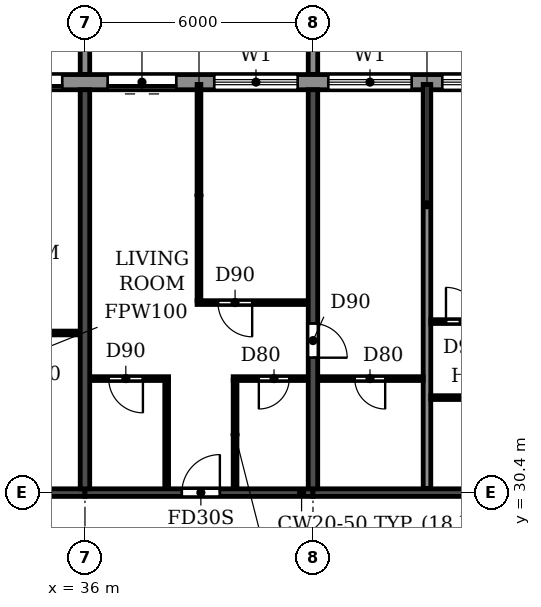
"""IFC4 building model, lengths in metres.
Left out: names, types, materials, properties, quantities, classifications, styles, units other than length and angle.
Written with IfcOpenShell. Run it as: python <this file> out.ifc"""

import sys

from ifc_helpers import new_model, si_unit, direction, frame, frame_2d, origin, place, context, subcontext, project, spatial, polyline, rectangle, outline, extrude, source, transform, mapped, element, fill, save


model = new_model("IFC4")
c1 = context("Model", 3, precision=1e-05, world=origin(), true_north=direction((0.0, 1.0)))
c2 = subcontext(c1, "Body", "Model", "MODEL_VIEW")
j1 = project(units=[si_unit("LENGTHUNIT", "METRE"), si_unit("PLANEANGLEUNIT", "RADIAN")], contexts=[c1])
p1 = place(None, origin())
s1 = spatial("IfcSite", under=j1, at=p1, CompositionType="ELEMENT")
p2 = place(p1, origin())
s2 = spatial("IfcBuilding", under=s1, at=p2, CompositionType="ELEMENT")
p3 = place(p2, frame((0.0, 0.0, 208.2)))
s3 = spatial("IfcBuildingStorey", under=s2, at=p3, CompositionType="ELEMENT", Elevation=208.2)
p4 = place(p3, frame((36.0, 30.5, 0.0), z_axis=(0.0, 0.0, 1.0), x_axis=(0.0, 1.0, 0.0)))
e1 = element("IfcWall", 1, at=p4, inside=s3, PredefinedType="SHEAR", context=c2, shape_type="SweptSolid", body=[
    extrude(rectangle(XDim=10.5, YDim=0.25, at=frame_2d((5.25, 0.0))), origin(), (0.0, 0.0, 1.0), 3.0),
])
p5 = place(p3, frame((42.0, 30.5, 0.0), z_axis=(0.0, 0.0, 1.0), x_axis=(0.0, 1.0, 0.0)))
e2 = element("IfcWall", 2, at=p5, inside=s3, PredefinedType="SHEAR", context=c2, shape_type="SweptSolid", body=[
    extrude(rectangle(XDim=10.5, YDim=0.25, at=frame_2d((5.25, 0.0))), origin(), (0.0, 0.0, 1.0), 3.0),
])
p6 = place(p5, frame((3.45, 0.0, 0.0)))
e3 = element("IfcOpeningElement", 3, at=p6, cuts=e2, PredefinedType="OPENING", context=c2, shape_type="SweptSolid", body=[
    extrude(rectangle(XDim=0.9, YDim=2.1, at=frame_2d((0.45, 1.05))), frame((0.0, 0.135, 0.0), z_axis=(0.0, -1.0, 0.0), x_axis=(1.0, 0.0, 0.0)), (0.0, 0.0, 1.0), 0.27),
])
p7 = place(p3, frame((30.0, 30.4, 0.0), z_axis=(0.0, 0.0, 1.0), x_axis=(1.0, 0.0, 0.0)))
e4 = element("IfcWall", 4, at=p7, inside=s3, PredefinedType="SHEAR", context=c2, shape_type="SweptSolid", body=[
    extrude(rectangle(XDim=6.0, YDim=0.2, at=frame_2d((3.0, 0.0))), origin(), (0.0, 0.0, 1.0), 2.4),
])
p8 = place(p7, frame((2.45, 0.0, 0.0)))
e5 = element("IfcOpeningElement", 5, at=p8, cuts=e4, PredefinedType="OPENING", context=c2, shape_type="SweptSolid", body=[
    extrude(rectangle(XDim=1.0, YDim=2.1, at=frame_2d((0.5, 1.05))), frame((0.0, 0.11, 0.0), z_axis=(0.0, -1.0, 0.0), x_axis=(1.0, 0.0, 0.0)), (0.0, 0.0, 1.0), 0.22),
])
p9 = place(p3, frame((36.0, 30.4, 0.0), z_axis=(0.0, 0.0, 1.0), x_axis=(1.0, 0.0, 0.0)))
e6 = element("IfcWall", 6, at=p9, inside=s3, PredefinedType="SHEAR", context=c2, shape_type="SweptSolid", body=[
    extrude(rectangle(XDim=6.0, YDim=0.2, at=frame_2d((3.0, 0.0))), origin(), (0.0, 0.0, 1.0), 2.4),
])
p10 = place(p9, frame((2.55, 0.0, 0.0)))
e7 = element("IfcOpeningElement", 7, at=p10, cuts=e6, PredefinedType="OPENING", context=c2, shape_type="SweptSolid", body=[
    extrude(rectangle(XDim=1.0, YDim=2.1, at=frame_2d((0.5, 1.05))), frame((0.0, 0.11, 0.0), z_axis=(0.0, -1.0, 0.0), x_axis=(1.0, 0.0, 0.0)), (0.0, 0.0, 1.0), 0.22),
])
p11 = place(p3, frame((42.0, 30.4, 0.0), z_axis=(0.0, 0.0, 1.0), x_axis=(1.0, 0.0, 0.0)))
e8 = element("IfcWall", 8, at=p11, inside=s3, PredefinedType="SHEAR", context=c2, shape_type="SweptSolid", body=[
    extrude(rectangle(XDim=6.0, YDim=0.2, at=frame_2d((3.0, 0.0))), origin(), (0.0, 0.0, 1.0), 2.4),
])
p12 = place(p3, frame((79.317, 41.2, 0.0), z_axis=(0.0, 0.0, 1.0), x_axis=(-1.0, 0.0, 0.0)))
e9 = element("IfcWall", 9, at=p12, inside=s3, PredefinedType="STANDARD", context=c2, shape_type="SweptSolid", body=[
    extrude(rectangle(XDim=56.634, YDim=0.4, at=frame_2d((28.317, 0.0))), origin(), (0.0, 0.0, 1.0), 3.0),
])
p13 = place(p12, frame((52.717, 0.0, 0.9)))
e10 = element("IfcOpeningElement", 10, at=p13, cuts=e9, PredefinedType="OPENING", context=c2, shape_type="SweptSolid", body=[
    extrude(rectangle(XDim=2.2, YDim=1.5, at=frame_2d((1.1, 0.75))), frame((0.0, 0.21, 0.0), z_axis=(0.0, -1.0, 0.0), x_axis=(1.0, 0.0, 0.0)), (0.0, 0.0, 1.0), 0.42),
])
p14 = place(p12, frame((49.917, 0.0, 0.0)))
e11 = element("IfcOpeningElement", 11, at=p14, cuts=e9, PredefinedType="OPENING", context=c2, shape_type="SweptSolid", body=[
    extrude(rectangle(XDim=1.8, YDim=2.4, at=frame_2d((0.9, 1.2))), frame((0.0, 0.21, 0.0), z_axis=(0.0, -1.0, 0.0), x_axis=(1.0, 0.0, 0.0)), (0.0, 0.0, 1.0), 0.42),
])
p15 = place(p12, frame((46.717, 0.0, 0.9)))
e12 = element("IfcOpeningElement", 12, at=p15, cuts=e9, PredefinedType="OPENING", context=c2, shape_type="SweptSolid", body=[
    extrude(rectangle(XDim=2.2, YDim=1.5, at=frame_2d((1.1, 0.75))), frame((0.0, 0.21, 0.0), z_axis=(0.0, -1.0, 0.0), x_axis=(1.0, 0.0, 0.0)), (0.0, 0.0, 1.0), 0.42),
])
p16 = place(p12, frame((43.917, 0.0, 0.0)))
e13 = element("IfcOpeningElement", 13, at=p16, cuts=e9, PredefinedType="OPENING", context=c2, shape_type="SweptSolid", body=[
    extrude(rectangle(XDim=1.8, YDim=2.4, at=frame_2d((0.9, 1.2))), frame((0.0, 0.21, 0.0), z_axis=(0.0, -1.0, 0.0), x_axis=(1.0, 0.0, 0.0)), (0.0, 0.0, 1.0), 0.42),
])
p17 = place(p12, frame((40.917, 0.0, 0.0)))
e14 = element("IfcOpeningElement", 14, at=p17, cuts=e9, PredefinedType="OPENING", context=c2, shape_type="SweptSolid", body=[
    extrude(rectangle(XDim=1.8, YDim=2.4, at=frame_2d((0.9, 1.2))), frame((0.0, 0.21, 0.0), z_axis=(0.0, -1.0, 0.0), x_axis=(1.0, 0.0, 0.0)), (0.0, 0.0, 1.0), 0.42),
])
p18 = place(p12, frame((37.717, 0.0, 0.9)))
e15 = element("IfcOpeningElement", 15, at=p18, cuts=e9, PredefinedType="OPENING", context=c2, shape_type="SweptSolid", body=[
    extrude(rectangle(XDim=2.2, YDim=1.5, at=frame_2d((1.1, 0.75))), frame((0.0, 0.21, 0.0), z_axis=(0.0, -1.0, 0.0), x_axis=(1.0, 0.0, 0.0)), (0.0, 0.0, 1.0), 0.42),
])
p19 = place(p12, frame((34.717, 0.0, 0.9)))
e16 = element("IfcOpeningElement", 16, at=p19, cuts=e9, PredefinedType="OPENING", context=c2, shape_type="SweptSolid", body=[
    extrude(rectangle(XDim=2.2, YDim=1.5, at=frame_2d((1.1, 0.75))), frame((0.0, 0.21, 0.0), z_axis=(0.0, -1.0, 0.0), x_axis=(1.0, 0.0, 0.0)), (0.0, 0.0, 1.0), 0.42),
])
p20 = place(p12, frame((31.717, 0.0, 0.9)))
e17 = element("IfcOpeningElement", 17, at=p20, cuts=e9, PredefinedType="OPENING", context=c2, shape_type="SweptSolid", body=[
    extrude(rectangle(XDim=2.2, YDim=1.5, at=frame_2d((1.1, 0.75))), frame((0.0, 0.21, 0.0), z_axis=(0.0, -1.0, 0.0), x_axis=(1.0, 0.0, 0.0)), (0.0, 0.0, 1.0), 0.42),
])
p21 = place(p12, frame((28.717, 0.0, 0.9)))
e18 = element("IfcOpeningElement", 18, at=p21, cuts=e9, PredefinedType="OPENING", context=c2, shape_type="SweptSolid", body=[
    extrude(rectangle(XDim=2.2, YDim=1.5, at=frame_2d((1.1, 0.75))), frame((0.0, 0.21, 0.0), z_axis=(0.0, -1.0, 0.0), x_axis=(1.0, 0.0, 0.0)), (0.0, 0.0, 1.0), 0.42),
])
p22 = place(p12, frame((25.917, 0.0, 0.0)))
e19 = element("IfcOpeningElement", 19, at=p22, cuts=e9, PredefinedType="OPENING", context=c2, shape_type="SweptSolid", body=[
    extrude(rectangle(XDim=1.8, YDim=2.4, at=frame_2d((0.9, 1.2))), frame((0.0, 0.21, 0.0), z_axis=(0.0, -1.0, 0.0), x_axis=(1.0, 0.0, 0.0)), (0.0, 0.0, 1.0), 0.42),
])
p23 = place(p12, frame((22.717, 0.0, 0.9)))
e20 = element("IfcOpeningElement", 20, at=p23, cuts=e9, PredefinedType="OPENING", context=c2, shape_type="SweptSolid", body=[
    extrude(rectangle(XDim=2.2, YDim=1.5, at=frame_2d((1.1, 0.75))), frame((0.0, 0.21, 0.0), z_axis=(0.0, -1.0, 0.0), x_axis=(1.0, 0.0, 0.0)), (0.0, 0.0, 1.0), 0.42),
])
p24 = place(p12, frame((19.717, 0.0, 0.9)))
e21 = element("IfcOpeningElement", 21, at=p24, cuts=e9, PredefinedType="OPENING", context=c2, shape_type="SweptSolid", body=[
    extrude(rectangle(XDim=2.2, YDim=1.5, at=frame_2d((1.1, 0.75))), frame((0.0, 0.21, 0.0), z_axis=(0.0, -1.0, 0.0), x_axis=(1.0, 0.0, 0.0)), (0.0, 0.0, 1.0), 0.42),
])
p25 = place(p12, frame((16.917, 0.0, 0.0)))
e22 = element("IfcOpeningElement", 22, at=p25, cuts=e9, PredefinedType="OPENING", context=c2, shape_type="SweptSolid", body=[
    extrude(rectangle(XDim=1.8, YDim=2.4, at=frame_2d((0.9, 1.2))), frame((0.0, 0.21, 0.0), z_axis=(0.0, -1.0, 0.0), x_axis=(1.0, 0.0, 0.0)), (0.0, 0.0, 1.0), 0.42),
])
p26 = place(p12, frame((13.717, 0.0, 0.9)))
e23 = element("IfcOpeningElement", 23, at=p26, cuts=e9, PredefinedType="OPENING", context=c2, shape_type="SweptSolid", body=[
    extrude(rectangle(XDim=2.2, YDim=1.5, at=frame_2d((1.1, 0.75))), frame((0.0, 0.21, 0.0), z_axis=(0.0, -1.0, 0.0), x_axis=(1.0, 0.0, 0.0)), (0.0, 0.0, 1.0), 0.42),
])
p27 = place(p12, frame((10.717, 0.0, 0.9)))
e24 = element("IfcOpeningElement", 24, at=p27, cuts=e9, PredefinedType="OPENING", context=c2, shape_type="SweptSolid", body=[
    extrude(rectangle(XDim=2.2, YDim=1.5, at=frame_2d((1.1, 0.75))), frame((0.0, 0.21, 0.0), z_axis=(0.0, -1.0, 0.0), x_axis=(1.0, 0.0, 0.0)), (0.0, 0.0, 1.0), 0.42),
])
p28 = place(p12, frame((7.717, 0.0, 0.9)))
e25 = element("IfcOpeningElement", 25, at=p28, cuts=e9, PredefinedType="OPENING", context=c2, shape_type="SweptSolid", body=[
    extrude(rectangle(XDim=2.2, YDim=1.5, at=frame_2d((1.1, 0.75))), frame((0.0, 0.21, 0.0), z_axis=(0.0, -1.0, 0.0), x_axis=(1.0, 0.0, 0.0)), (0.0, 0.0, 1.0), 0.42),
])
p29 = place(p12, frame((4.917, 0.0, 0.0)))
e26 = element("IfcOpeningElement", 26, at=p29, cuts=e9, PredefinedType="OPENING", context=c2, shape_type="SweptSolid", body=[
    extrude(rectangle(XDim=1.8, YDim=2.4, at=frame_2d((0.9, 1.2))), frame((0.0, 0.21, 0.0), z_axis=(0.0, -1.0, 0.0), x_axis=(1.0, 0.0, 0.0)), (0.0, 0.0, 1.0), 0.42),
])
p30 = place(p12, frame((1.717, 0.0, 0.9)))
e27 = element("IfcOpeningElement", 27, at=p30, cuts=e9, PredefinedType="OPENING", context=c2, shape_type="SweptSolid", body=[
    extrude(rectangle(XDim=2.2, YDim=1.5, at=frame_2d((1.1, 0.75))), frame((0.0, 0.21, 0.0), z_axis=(0.0, -1.0, 0.0), x_axis=(1.0, 0.0, 0.0)), (0.0, 0.0, 1.0), 0.42),
])
m1 = source(origin(), c2, "Body", "SweptSolid", [
    extrude(outline(polyline([(0.0, 0.0), (0.25, 0.0), (0.25, 3.1), (0.0, 3.1), (0.0, 0.0)])), origin(), (0.0, 0.0, 1.0), 3.1),
])
for number, where in (
    (28, (35.875, 41.4, 0.0)),
    (29, (41.875, 41.4, 0.0)),
):
    element("IfcWall", number, at=place(p3, frame(where)), inside=s3, PredefinedType="STANDARD", context=c2, shape_type="MappedRepresentation", body=[
        mapped(m1, transform((0.0, 0.0, 0.0))),
    ])
p31 = place(p3, frame((45.0, 30.51, 0.0), z_axis=(0.0, 0.0, 1.0), x_axis=(0.0, 1.0, 0.0)))
e30 = element("IfcWall", 30, at=p31, inside=s3, PredefinedType="PARTITIONING", context=c2, shape_type="SweptSolid", body=[
    extrude(rectangle(XDim=10.63, YDim=0.2, at=frame_2d((5.315, 0.0))), origin(), (0.0, 0.0, 1.0), 3.0),
])
p32 = place(p3, frame((45.1, 32.9, 0.0), z_axis=(0.0, 0.0, 1.0), x_axis=(1.0, 0.0, 0.0)))
e31 = element("IfcWall", 31, at=p32, inside=s3, PredefinedType="PARTITIONING", context=c2, shape_type="SweptSolid", body=[
    extrude(rectangle(XDim=2.765, YDim=0.1, at=frame_2d((1.382, 0.0))), origin(), (0.0, 0.0, 1.0), 3.0),
])
p33 = place(p32, frame((1.0, 0.0, 0.0)))
e32 = element("IfcOpeningElement", 32, at=p33, cuts=e31, PredefinedType="OPENING", context=c2, shape_type="SweptSolid", body=[
    extrude(rectangle(XDim=0.8, YDim=2.1, at=frame_2d((0.4, 1.05))), frame((0.0, 0.06, 0.0), z_axis=(0.0, -1.0, 0.0), x_axis=(1.0, 0.0, 0.0)), (0.0, 0.0, 1.0), 0.12),
])
p34 = place(p3, frame((36.135, 33.4, 0.0), z_axis=(0.0, 0.0, 1.0), x_axis=(1.0, 0.0, 0.0)))
e33 = element("IfcWall", 33, at=p34, inside=s3, PredefinedType="PARTITIONING", context=c2, shape_type="SweptSolid", body=[
    extrude(rectangle(XDim=2.065, YDim=0.1, at=frame_2d((1.032, 0.0))), origin(), (0.0, 0.0, 1.0), 3.0),
])
p35 = place(p34, frame((0.49, 0.0, 0.0)))
e34 = element("IfcOpeningElement", 34, at=p35, cuts=e33, PredefinedType="OPENING", context=c2, shape_type="SweptSolid", body=[
    extrude(rectangle(XDim=0.9, YDim=2.1, at=frame_2d((0.45, 1.05))), frame((0.0, 0.06, 0.0), z_axis=(0.0, -1.0, 0.0), x_axis=(1.0, 0.0, 0.0)), (0.0, 0.0, 1.0), 0.12),
])
p36 = place(p3, frame((39.9, 33.4, 0.0), z_axis=(0.0, 0.0, 1.0), x_axis=(1.0, 0.0, 0.0)))
e35 = element("IfcWall", 35, at=p36, inside=s3, PredefinedType="PARTITIONING", context=c2, shape_type="SweptSolid", body=[
    extrude(rectangle(XDim=1.965, YDim=0.1, at=frame_2d((0.982, 0.0))), origin(), (0.0, 0.0, 1.0), 3.0),
])
p37 = place(p36, frame((0.675, 0.0, 0.0)))
e36 = element("IfcOpeningElement", 36, at=p37, cuts=e35, PredefinedType="OPENING", context=c2, shape_type="SweptSolid", body=[
    extrude(rectangle(XDim=0.8, YDim=2.1, at=frame_2d((0.4, 1.05))), frame((0.0, 0.06, 0.0), z_axis=(0.0, -1.0, 0.0), x_axis=(1.0, 0.0, 0.0)), (0.0, 0.0, 1.0), 0.12),
])
p38 = place(p3, frame((42.135, 33.4, 0.0), z_axis=(0.0, 0.0, 1.0), x_axis=(1.0, 0.0, 0.0)))
e37 = element("IfcWall", 37, at=p38, inside=s3, PredefinedType="PARTITIONING", context=c2, shape_type="SweptSolid", body=[
    extrude(rectangle(XDim=2.765, YDim=0.1, at=frame_2d((1.382, 0.0))), origin(), (0.0, 0.0, 1.0), 3.0),
])
p39 = place(p38, frame((0.965, 0.0, 0.0)))
e38 = element("IfcOpeningElement", 38, at=p39, cuts=e37, PredefinedType="OPENING", context=c2, shape_type="SweptSolid", body=[
    extrude(rectangle(XDim=0.8, YDim=2.1, at=frame_2d((0.4, 1.05))), frame((0.0, 0.06, 0.0), z_axis=(0.0, -1.0, 0.0), x_axis=(1.0, 0.0, 0.0)), (0.0, 0.0, 1.0), 0.12),
])
p40 = place(p3, frame((33.8, 34.6, 0.0), z_axis=(0.0, 0.0, 1.0), x_axis=(1.0, 0.0, 0.0)))
e39 = element("IfcWall", 39, at=p40, inside=s3, PredefinedType="PARTITIONING", context=c2, shape_type="SweptSolid", body=[
    extrude(rectangle(XDim=2.065, YDim=0.1, at=frame_2d((1.032, 0.0))), origin(), (0.0, 0.0, 1.0), 3.0),
])
p41 = place(p3, frame((45.1, 34.9, 0.0), z_axis=(0.0, 0.0, 1.0), x_axis=(1.0, 0.0, 0.0)))
e40 = element("IfcWall", 40, at=p41, inside=s3, PredefinedType="PARTITIONING", context=c2, shape_type="SweptSolid", body=[
    extrude(rectangle(XDim=2.765, YDim=0.1, at=frame_2d((1.382, 0.0))), origin(), (0.0, 0.0, 1.0), 3.0),
])
p42 = place(p41, frame((0.4, 0.0, 0.0)))
e41 = element("IfcOpeningElement", 41, at=p42, cuts=e40, PredefinedType="OPENING", context=c2, shape_type="SweptSolid", body=[
    extrude(rectangle(XDim=0.9, YDim=2.1, at=frame_2d((0.45, 1.05))), frame((0.0, 0.06, 0.0), z_axis=(0.0, -1.0, 0.0), x_axis=(1.0, 0.0, 0.0)), (0.0, 0.0, 1.0), 0.12),
])
p43 = place(p3, frame((38.95, 35.4, 0.0), z_axis=(0.0, 0.0, 1.0), x_axis=(1.0, 0.0, 0.0)))
e42 = element("IfcWall", 42, at=p43, inside=s3, PredefinedType="PARTITIONING", context=c2, shape_type="SweptSolid", body=[
    extrude(rectangle(XDim=2.915, YDim=0.1, at=frame_2d((1.458, 0.0))), origin(), (0.0, 0.0, 1.0), 3.0),
])
p44 = place(p43, frame((0.55, 0.0, 0.0)))
e43 = element("IfcOpeningElement", 43, at=p44, cuts=e42, PredefinedType="OPENING", context=c2, shape_type="SweptSolid", body=[
    extrude(rectangle(XDim=0.9, YDim=2.1, at=frame_2d((0.45, 1.05))), frame((0.0, 0.06, 0.0), z_axis=(0.0, -1.0, 0.0), x_axis=(1.0, 0.0, 0.0)), (0.0, 0.0, 1.0), 0.12),
])
p45 = place(p3, frame((38.15, 30.51, 0.0), z_axis=(0.0, 0.0, 1.0), x_axis=(0.0, 1.0, 0.0)))
e44 = element("IfcWall", 44, at=p45, inside=s3, PredefinedType="PARTITIONING", context=c2, shape_type="SweptSolid", body=[
    extrude(rectangle(XDim=2.84, YDim=0.1, at=frame_2d((1.42, 0.0))), origin(), (0.0, 0.0, 1.0), 3.0),
])
p46 = place(p3, frame((39.0, 35.45, 0.0), z_axis=(0.0, 0.0, 1.0), x_axis=(0.0, 1.0, 0.0)))
e45 = element("IfcWall", 45, at=p46, inside=s3, PredefinedType="PARTITIONING", context=c2, shape_type="SweptSolid", body=[
    extrude(rectangle(XDim=5.69, YDim=0.1, at=frame_2d((2.845, 0.0))), origin(), (0.0, 0.0, 1.0), 3.0),
])
p47 = place(p3, frame((39.95, 30.51, 0.0), z_axis=(0.0, 0.0, 1.0), x_axis=(0.0, 1.0, 0.0)))
e46 = element("IfcWall", 46, at=p47, inside=s3, PredefinedType="PARTITIONING", context=c2, shape_type="SweptSolid", body=[
    extrude(rectangle(XDim=2.84, YDim=0.1, at=frame_2d((1.42, 0.0))), origin(), (0.0, 0.0, 1.0), 3.0),
])
p48 = place(p16, origin())
e47 = element("IfcDoor", 47, at=p48, inside=s3, OperationType="DOUBLE_DOOR_SLIDING", PredefinedType="DOOR", context=c2, shape_type="SweptSolid", body=[
    extrude(rectangle(XDim=1.8, YDim=2.4, at=frame_2d((0.9, 1.2))), frame((0.0, 0.025, 0.0), z_axis=(0.0, -1.0, 0.0), x_axis=(1.0, 0.0, 0.0)), (0.0, 0.0, 1.0), 0.05),
])
fill(e13, e47)
p49 = place(p17, origin())
e48 = element("IfcDoor", 48, at=p49, inside=s3, OperationType="DOUBLE_DOOR_SLIDING", PredefinedType="DOOR", context=c2, shape_type="SweptSolid", body=[
    extrude(rectangle(XDim=1.8, YDim=2.4, at=frame_2d((0.9, 1.2))), frame((0.0, 0.025, 0.0), z_axis=(0.0, -1.0, 0.0), x_axis=(1.0, 0.0, 0.0)), (0.0, 0.0, 1.0), 0.05),
])
fill(e14, e48)
p50 = place(p18, origin())
e49 = element("IfcWindow", 49, at=p50, inside=s3, PartitioningType="DOUBLE_PANEL_HORIZONTAL", PredefinedType="WINDOW", context=c2, shape_type="SweptSolid", body=[
    extrude(rectangle(XDim=2.2, YDim=1.5, at=frame_2d((1.1, 0.75))), frame((0.0, 0.03, 0.0), z_axis=(0.0, -1.0, 0.0), x_axis=(1.0, 0.0, 0.0)), (0.0, 0.0, 1.0), 0.06),
])
fill(e15, e49)
p51 = place(p19, origin())
e50 = element("IfcWindow", 50, at=p51, inside=s3, PartitioningType="DOUBLE_PANEL_HORIZONTAL", PredefinedType="WINDOW", context=c2, shape_type="SweptSolid", body=[
    extrude(rectangle(XDim=2.2, YDim=1.5, at=frame_2d((1.1, 0.75))), frame((0.0, 0.03, 0.0), z_axis=(0.0, -1.0, 0.0), x_axis=(1.0, 0.0, 0.0)), (0.0, 0.0, 1.0), 0.06),
])
fill(e16, e50)
p52 = place(p20, origin())
e51 = element("IfcWindow", 51, at=p52, inside=s3, PartitioningType="DOUBLE_PANEL_HORIZONTAL", PredefinedType="WINDOW", context=c2, shape_type="SweptSolid", body=[
    extrude(rectangle(XDim=2.2, YDim=1.5, at=frame_2d((1.1, 0.75))), frame((0.0, 0.03, 0.0), z_axis=(0.0, -1.0, 0.0), x_axis=(1.0, 0.0, 0.0)), (0.0, 0.0, 1.0), 0.06),
])
fill(e17, e51)
p53 = place(p39, frame((0.8, 0.0, 0.0), z_axis=(0.0, 0.0, 1.0), x_axis=(-1.0, 0.0, 0.0)))
e52 = element("IfcDoor", 52, at=p53, inside=s3, OperationType="SINGLE_SWING_LEFT", PredefinedType="DOOR", context=c2, shape_type="SweptSolid", body=[
    extrude(rectangle(XDim=0.8, YDim=2.1, at=frame_2d((0.4, 1.05))), frame((0.0, 0.025, 0.0), z_axis=(0.0, -1.0, 0.0), x_axis=(1.0, 0.0, 0.0)), (0.0, 0.0, 1.0), 0.05),
])
fill(e38, e52)
p54 = place(p35, frame((0.9, 0.0, 0.0), z_axis=(0.0, 0.0, 1.0), x_axis=(-1.0, 0.0, 0.0)))
e53 = element("IfcDoor", 53, at=p54, inside=s3, OperationType="SINGLE_SWING_LEFT", PredefinedType="DOOR", context=c2, shape_type="SweptSolid", body=[
    extrude(rectangle(XDim=0.9, YDim=2.1, at=frame_2d((0.45, 1.05))), frame((0.0, 0.025, 0.0), z_axis=(0.0, -1.0, 0.0), x_axis=(1.0, 0.0, 0.0)), (0.0, 0.0, 1.0), 0.05),
])
fill(e34, e53)
p55 = place(p10, origin())
e54 = element("IfcDoor", 54, at=p55, inside=s3, OperationType="SINGLE_SWING_RIGHT", PredefinedType="DOOR", context=c2, shape_type="SweptSolid", body=[
    extrude(rectangle(XDim=1.0, YDim=2.1, at=frame_2d((0.5, 1.05))), frame((0.0, 0.025, 0.0), z_axis=(0.0, -1.0, 0.0), x_axis=(1.0, 0.0, 0.0)), (0.0, 0.0, 1.0), 0.05),
])
fill(e7, e54)
p56 = place(p44, frame((0.9, 0.0, 0.0), z_axis=(0.0, 0.0, 1.0), x_axis=(-1.0, 0.0, 0.0)))
e55 = element("IfcDoor", 55, at=p56, inside=s3, OperationType="SINGLE_SWING_LEFT", PredefinedType="DOOR", context=c2, shape_type="SweptSolid", body=[
    extrude(rectangle(XDim=0.9, YDim=2.1, at=frame_2d((0.45, 1.05))), frame((0.0, 0.025, 0.0), z_axis=(0.0, -1.0, 0.0), x_axis=(1.0, 0.0, 0.0)), (0.0, 0.0, 1.0), 0.05),
])
fill(e43, e55)
p57 = place(p37, frame((0.8, 0.0, 0.0), z_axis=(0.0, 0.0, 1.0), x_axis=(-1.0, 0.0, 0.0)))
e56 = element("IfcDoor", 56, at=p57, inside=s3, OperationType="SINGLE_SWING_RIGHT", PredefinedType="DOOR", context=c2, shape_type="SweptSolid", body=[
    extrude(rectangle(XDim=0.8, YDim=2.1, at=frame_2d((0.4, 1.05))), frame((0.0, 0.025, 0.0), z_axis=(0.0, -1.0, 0.0), x_axis=(1.0, 0.0, 0.0)), (0.0, 0.0, 1.0), 0.05),
])
fill(e36, e56)
p58 = place(p6, frame((0.9, 0.0, 0.0), z_axis=(0.0, 0.0, 1.0), x_axis=(-1.0, 0.0, 0.0)))
e57 = element("IfcDoor", 57, at=p58, inside=s3, OperationType="SINGLE_SWING_RIGHT", PredefinedType="DOOR", context=c2, shape_type="SweptSolid", body=[
    extrude(rectangle(XDim=0.9, YDim=2.1, at=frame_2d((0.45, 1.05))), frame((0.0, 0.025, 0.0), z_axis=(0.0, -1.0, 0.0), x_axis=(1.0, 0.0, 0.0)), (0.0, 0.0, 1.0), 0.05),
])
fill(e3, e57)
p59 = place(p42, origin())
e58 = element("IfcDoor", 58, at=p59, inside=s3, OperationType="SINGLE_SWING_LEFT", PredefinedType="DOOR", context=c2, shape_type="SweptSolid", body=[
    extrude(rectangle(XDim=0.9, YDim=2.1, at=frame_2d((0.45, 1.05))), frame((0.0, 0.025, 0.0), z_axis=(0.0, -1.0, 0.0), x_axis=(1.0, 0.0, 0.0)), (0.0, 0.0, 1.0), 0.05),
])
fill(e41, e58)
save(model, sys.argv[1])
